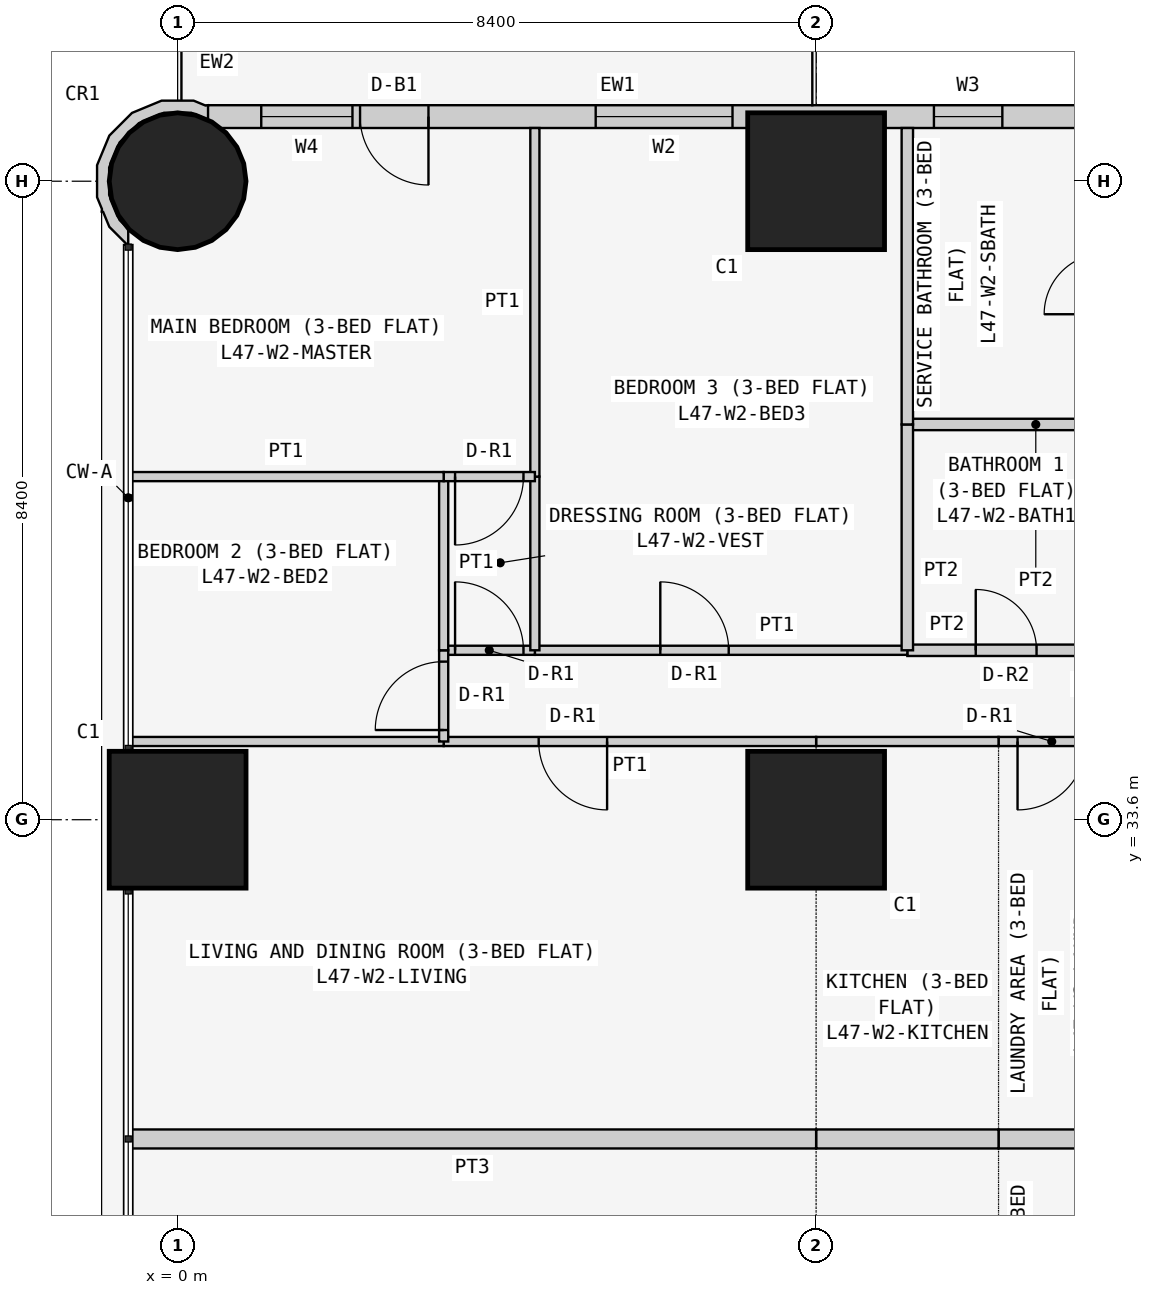
"""IFC4 building model, lengths in metres.
Left out: names, types, materials, properties, quantities, classifications, styles, units other than length and angle.
Written with IfcOpenShell. Run it as: python <this file> out.ifc"""

import sys

from ifc_helpers import new_model, si_unit, direction, frame, frame_2d, origin, origin_2d, place, context, subcontext, project, spatial, polyline, rectangle, circle, outline, extrude, element, fill, save


model = new_model("IFC4")
c1 = context("Model", 3, precision=1e-05, world=origin(), true_north=direction((0.0, 1.0)))
c2 = subcontext(c1, "Body", "Model", "MODEL_VIEW")
j1 = project(units=[si_unit("LENGTHUNIT", "METRE"), si_unit("PLANEANGLEUNIT", "RADIAN")], contexts=[c1])
p1 = place(None, origin())
s1 = spatial("IfcSite", under=j1, at=p1, CompositionType="ELEMENT")
p2 = place(p1, origin())
s2 = spatial("IfcBuilding", under=s1, at=p2, CompositionType="ELEMENT")
p3 = place(p2, frame((0.0, 0.0, 183.3)))
s3 = spatial("IfcBuildingStorey", under=s2, at=p3, CompositionType="ELEMENT", Elevation=183.3)
p4 = place(p3, frame((0.0, 33.6, 0.0), z_axis=(0.0, 0.0, 1.0), x_axis=(1.0, 0.0, 0.0)))
e1 = element("IfcColumn", 1, at=p4, inside=s3, PredefinedType="COLUMN", context=c2, shape_type="SweptSolid", body=[
    extrude(rectangle(XDim=1.8, YDim=1.8, at=origin_2d()), origin(), (0.0, 0.0, 1.0), 3.6),
])
p5 = place(p3, frame((0.0, 42.0, 0.0), z_axis=(0.0, 0.0, 1.0), x_axis=(1.0, 0.0, 0.0)))
e2 = element("IfcColumn", 2, at=p5, inside=s3, PredefinedType="COLUMN", context=c2, shape_type="SweptSolid", body=[
    extrude(circle(Radius=0.9, at=origin_2d()), origin(), (0.0, 0.0, 1.0), 3.6),
])
for number, where, z_axis, x_axis in (
    (3, (8.4, 33.6, 0.0), (0.0, 0.0, 1.0), (1.0, 0.0, 0.0)),
    (4, (8.4, 42.0, 0.0), (0.0, 0.0, 1.0), (1.0, 0.0, 0.0)),
):
    element("IfcColumn", number, at=place(p3, frame(where, z_axis=z_axis, x_axis=x_axis)), inside=s3, PredefinedType="COLUMN", context=c2, shape_type="SweptSolid", body=[
        extrude(rectangle(XDim=1.8, YDim=1.8, at=origin_2d()), origin(), (0.0, 0.0, 1.0), 3.6),
    ])
p6 = place(p3, frame((15.8, 42.85, 0.0), z_axis=(0.0, 0.0, 1.0), x_axis=(-1.0, 0.0, 0.0)))
e5 = element("IfcWall", 5, at=p6, inside=s3, PredefinedType="SOLIDWALL", context=c2, shape_type="SweptSolid", body=[
    extrude(rectangle(XDim=15.4, YDim=0.3, at=frame_2d((7.7, 0.0))), origin(), (0.0, 0.0, 1.0), 3.45),
])
p7 = place(p6, frame((1.2, 0.0, 0.9)))
e6 = element("IfcOpeningElement", 6, at=p7, cuts=e5, PredefinedType="OPENING", context=c2, shape_type="SweptSolid", body=[
    extrude(rectangle(XDim=1.8, YDim=1.5, at=frame_2d((0.9, 0.75))), frame((0.0, 0.16, 0.0), z_axis=(0.0, -1.0, 0.0), x_axis=(1.0, 0.0, 0.0)), (0.0, 0.0, 1.0), 0.32),
])
p8 = place(p6, frame((4.95, 0.0, 1.5)))
e7 = element("IfcOpeningElement", 7, at=p8, cuts=e5, PredefinedType="OPENING", context=c2, shape_type="SweptSolid", body=[
    extrude(rectangle(XDim=0.9, YDim=0.7, at=frame_2d((0.45, 0.35))), frame((0.0, 0.16, 0.0), z_axis=(0.0, -1.0, 0.0), x_axis=(1.0, 0.0, 0.0)), (0.0, 0.0, 1.0), 0.32),
])
p9 = place(p6, frame((8.5, 0.0, 0.9)))
e8 = element("IfcOpeningElement", 8, at=p9, cuts=e5, PredefinedType="OPENING", context=c2, shape_type="SweptSolid", body=[
    extrude(rectangle(XDim=1.8, YDim=1.5, at=frame_2d((0.9, 0.75))), frame((0.0, 0.16, 0.0), z_axis=(0.0, -1.0, 0.0), x_axis=(1.0, 0.0, 0.0)), (0.0, 0.0, 1.0), 0.32),
])
p10 = place(p6, frame((12.5, 0.0, 0.0)))
e9 = element("IfcOpeningElement", 9, at=p10, cuts=e5, PredefinedType="OPENING", context=c2, shape_type="SweptSolid", body=[
    extrude(rectangle(XDim=0.9, YDim=2.4, at=frame_2d((0.45, 1.2))), frame((0.0, 0.16, 0.0), z_axis=(0.0, -1.0, 0.0), x_axis=(1.0, 0.0, 0.0)), (0.0, 0.0, 1.0), 0.32),
])
p11 = place(p6, frame((13.5, 0.0, 0.9)))
e10 = element("IfcOpeningElement", 10, at=p11, cuts=e5, PredefinedType="OPENING", context=c2, shape_type="SweptSolid", body=[
    extrude(rectangle(XDim=1.2, YDim=1.5, at=frame_2d((0.6, 0.75))), frame((0.0, 0.16, 0.0), z_axis=(0.0, -1.0, 0.0), x_axis=(1.0, 0.0, 0.0)), (0.0, 0.0, 1.0), 0.32),
])
p12 = place(p3, frame((0.364, 42.91, 0.0), z_axis=(0.0, 0.0, 1.0), x_axis=(-0.926129809145, 0.377204953059, 0.0)))
e11 = element("IfcWall", 11, at=p12, inside=s3, PredefinedType="SOLIDWALL", context=c2, shape_type="SweptSolid", body=[
    extrude(outline(polyline([(0.36, 1.803), (0.509, 1.741), (0.761, 1.486), (0.896, 1.154), (0.894, 0.795), (0.755, 0.465), (0.5, 0.213), (0.168, 0.078), (-0.1, 0.08), (0.001, -0.097), (0.03, -0.08), (0.199, -0.081), (0.589, 0.078), (0.889, 0.374), (1.053, 0.763), (1.055, 1.185), (0.896, 1.575), (0.778, 1.695), (0.769, 1.728), (0.75, 1.723), (0.6, 1.875), (0.295, 2.003), (0.281, 1.998), (0.36, 1.803)])), origin(), (0.0, 0.0, 1.0), 3.45),
])
p13 = place(p3, frame((12.2, 29.4, 0.0), z_axis=(0.0, 0.0, 1.0), x_axis=(-1.0, 0.0, 0.0)))
e12 = element("IfcWall", 12, at=p13, inside=s3, PredefinedType="PARTITIONING", context=c2, shape_type="SweptSolid", body=[
    extrude(rectangle(XDim=1.4, YDim=0.25, at=frame_2d((0.7, 0.0))), origin(), (0.0, 0.0, 1.0), 3.45),
])
p14 = place(p3, frame((10.8, 29.4, 0.0), z_axis=(0.0, 0.0, 1.0), x_axis=(-1.0, 0.0, 0.0)))
e13 = element("IfcWall", 13, at=p14, inside=s3, PredefinedType="PARTITIONING", context=c2, shape_type="SweptSolid", body=[
    extrude(rectangle(XDim=2.4, YDim=0.25, at=frame_2d((1.2, 0.0))), origin(), (0.0, 0.0, 1.0), 3.45),
])
p15 = place(p3, frame((8.4, 29.4, 0.0), z_axis=(0.0, 0.0, 1.0), x_axis=(-1.0, 0.0, 0.0)))
e14 = element("IfcWall", 14, at=p15, inside=s3, PredefinedType="PARTITIONING", context=c2, shape_type="SweptSolid", body=[
    extrude(rectangle(XDim=9.05, YDim=0.25, at=frame_2d((4.525, 0.0))), origin(), (0.0, 0.0, 1.0), 3.45),
])
p16 = place(p3, frame((10.8, 34.629, 0.0), z_axis=(0.0, 0.0, 1.0), x_axis=(1.0, 0.0, 0.0)))
e15 = element("IfcWall", 15, at=p16, inside=s3, PredefinedType="PARTITIONING", context=c2, shape_type="SweptSolid", body=[
    extrude(rectangle(XDim=1.4, YDim=0.12, at=frame_2d((0.7, 0.0))), origin(), (0.0, 0.0, 1.0), 3.45),
])
p17 = place(p16, frame((0.25, 0.0, 0.0)))
e16 = element("IfcOpeningElement", 16, at=p17, cuts=e15, PredefinedType="OPENING", context=c2, shape_type="SweptSolid", body=[
    extrude(rectangle(XDim=0.9, YDim=2.1, at=frame_2d((0.45, 1.05))), frame((0.0, 0.07, 0.0), z_axis=(0.0, -1.0, 0.0), x_axis=(1.0, 0.0, 0.0)), (0.0, 0.0, 1.0), 0.14),
])
p18 = place(p3, frame((8.4, 34.629, 0.0), z_axis=(0.0, 0.0, 1.0), x_axis=(1.0, 0.0, 0.0)))
e17 = element("IfcWall", 17, at=p18, inside=s3, PredefinedType="PARTITIONING", context=c2, shape_type="SweptSolid", body=[
    extrude(rectangle(XDim=2.4, YDim=0.12, at=frame_2d((1.2, 0.0))), origin(), (0.0, 0.0, 1.0), 3.45),
])
p19 = place(p3, frame((3.5, 34.629, 0.0), z_axis=(0.0, 0.0, 1.0), x_axis=(1.0, 0.0, 0.0)))
e18 = element("IfcWall", 18, at=p19, inside=s3, PredefinedType="PARTITIONING", context=c2, shape_type="SweptSolid", body=[
    extrude(rectangle(XDim=4.9, YDim=0.12, at=frame_2d((2.45, 0.0))), origin(), (0.0, 0.0, 1.0), 3.45),
])
p20 = place(p19, frame((1.25, 0.0, 0.0)))
e19 = element("IfcOpeningElement", 19, at=p20, cuts=e18, PredefinedType="OPENING", context=c2, shape_type="SweptSolid", body=[
    extrude(rectangle(XDim=0.9, YDim=2.1, at=frame_2d((0.45, 1.05))), frame((0.0, 0.07, 0.0), z_axis=(0.0, -1.0, 0.0), x_axis=(1.0, 0.0, 0.0)), (0.0, 0.0, 1.0), 0.14),
])
p21 = place(p3, frame((-0.65, 34.629, 0.0), z_axis=(0.0, 0.0, 1.0), x_axis=(1.0, 0.0, 0.0)))
e20 = element("IfcWall", 20, at=p21, inside=s3, PredefinedType="PARTITIONING", context=c2, shape_type="SweptSolid", body=[
    extrude(rectangle(XDim=4.15, YDim=0.12, at=frame_2d((2.075, 0.0))), origin(), (0.0, 0.0, 1.0), 3.45),
])
p22 = place(p3, frame((9.6, 35.829, 0.0), z_axis=(0.0, 0.0, 1.0), x_axis=(1.0, 0.0, 0.0)))
e21 = element("IfcWall", 21, at=p22, inside=s3, PredefinedType="PARTITIONING", context=c2, shape_type="SweptSolid", body=[
    extrude(rectangle(XDim=2.6, YDim=0.15, at=frame_2d((1.3, 0.0))), origin(), (0.0, 0.0, 1.0), 3.45),
])
p23 = place(p22, frame((0.9, 0.0, 0.0)))
e22 = element("IfcOpeningElement", 22, at=p23, cuts=e21, PredefinedType="OPENING", context=c2, shape_type="SweptSolid", body=[
    extrude(rectangle(XDim=0.8, YDim=2.1, at=frame_2d((0.4, 1.05))), frame((0.0, 0.085, 0.0), z_axis=(0.0, -1.0, 0.0), x_axis=(1.0, 0.0, 0.0)), (0.0, 0.0, 1.0), 0.17),
])
p24 = place(p3, frame((4.7, 35.829, 0.0), z_axis=(0.0, 0.0, 1.0), x_axis=(1.0, 0.0, 0.0)))
e23 = element("IfcWall", 23, at=p24, inside=s3, PredefinedType="PARTITIONING", context=c2, shape_type="SweptSolid", body=[
    extrude(rectangle(XDim=4.9, YDim=0.12, at=frame_2d((2.45, 0.0))), origin(), (0.0, 0.0, 1.0), 3.45),
])
p25 = place(p24, frame((1.65, 0.0, 0.0)))
e24 = element("IfcOpeningElement", 24, at=p25, cuts=e23, PredefinedType="OPENING", context=c2, shape_type="SweptSolid", body=[
    extrude(rectangle(XDim=0.9, YDim=2.1, at=frame_2d((0.45, 1.05))), frame((0.0, 0.07, 0.0), z_axis=(0.0, -1.0, 0.0), x_axis=(1.0, 0.0, 0.0)), (0.0, 0.0, 1.0), 0.14),
])
p26 = place(p3, frame((3.5, 35.829, 0.0), z_axis=(0.0, 0.0, 1.0), x_axis=(1.0, 0.0, 0.0)))
e25 = element("IfcWall", 25, at=p26, inside=s3, PredefinedType="PARTITIONING", context=c2, shape_type="SweptSolid", body=[
    extrude(rectangle(XDim=1.2, YDim=0.12, at=frame_2d((0.6, 0.0))), origin(), (0.0, 0.0, 1.0), 3.45),
])
p27 = place(p26, frame((0.15, 0.0, 0.0)))
e26 = element("IfcOpeningElement", 26, at=p27, cuts=e25, PredefinedType="OPENING", context=c2, shape_type="SweptSolid", body=[
    extrude(rectangle(XDim=0.9, YDim=2.1, at=frame_2d((0.45, 1.05))), frame((0.0, 0.07, 0.0), z_axis=(0.0, -1.0, 0.0), x_axis=(1.0, 0.0, 0.0)), (0.0, 0.0, 1.0), 0.14),
])
p28 = place(p3, frame((3.5, 34.629, 0.0), z_axis=(0.0, 0.0, 1.0), x_axis=(0.0, 1.0, 0.0)))
e27 = element("IfcWall", 27, at=p28, inside=s3, PredefinedType="PARTITIONING", context=c2, shape_type="SweptSolid", body=[
    extrude(rectangle(XDim=1.2, YDim=0.12, at=frame_2d((0.6, 0.0))), origin(), (0.0, 0.0, 1.0), 3.45),
])
p29 = place(p28, frame((0.151, 0.0, 0.0)))
e28 = element("IfcOpeningElement", 28, at=p29, cuts=e27, PredefinedType="OPENING", context=c2, shape_type="SweptSolid", body=[
    extrude(rectangle(XDim=0.9, YDim=2.1, at=frame_2d((0.45, 1.05))), frame((0.0, 0.07, 0.0), z_axis=(0.0, -1.0, 0.0), x_axis=(1.0, 0.0, 0.0)), (0.0, 0.0, 1.0), 0.14),
])
p30 = place(p3, frame((9.6, 38.8, 0.0), z_axis=(0.0, 0.0, 1.0), x_axis=(1.0, 0.0, 0.0)))
e29 = element("IfcWall", 29, at=p30, inside=s3, PredefinedType="PARTITIONING", context=c2, shape_type="SweptSolid", body=[
    extrude(rectangle(XDim=2.6, YDim=0.15, at=frame_2d((1.3, 0.0))), origin(), (0.0, 0.0, 1.0), 3.45),
])
p31 = place(p3, frame((9.6, 35.829, 0.0), z_axis=(0.0, 0.0, 1.0), x_axis=(0.0, 1.0, 0.0)))
e30 = element("IfcWall", 30, at=p31, inside=s3, PredefinedType="PARTITIONING", context=c2, shape_type="SweptSolid", body=[
    extrude(rectangle(XDim=2.971, YDim=0.15, at=frame_2d((1.485, 0.0))), origin(), (0.0, 0.0, 1.0), 3.45),
])
p32 = place(p3, frame((9.6, 38.8, 0.0), z_axis=(0.0, 0.0, 1.0), x_axis=(0.0, 1.0, 0.0)))
e31 = element("IfcWall", 31, at=p32, inside=s3, PredefinedType="PARTITIONING", context=c2, shape_type="SweptSolid", body=[
    extrude(rectangle(XDim=3.9, YDim=0.15, at=frame_2d((1.95, 0.0))), origin(), (0.0, 0.0, 1.0), 3.45),
])
p33 = place(p3, frame((4.7, 35.829, 0.0), z_axis=(0.0, 0.0, 1.0), x_axis=(0.0, 1.0, 0.0)))
e32 = element("IfcWall", 32, at=p33, inside=s3, PredefinedType="PARTITIONING", context=c2, shape_type="SweptSolid", body=[
    extrude(rectangle(XDim=2.285, YDim=0.12, at=frame_2d((1.143, 0.0))), origin(), (0.0, 0.0, 1.0), 3.45),
])
p34 = place(p3, frame((4.7, 38.114, 0.0), z_axis=(0.0, 0.0, 1.0), x_axis=(0.0, 1.0, 0.0)))
e33 = element("IfcWall", 33, at=p34, inside=s3, PredefinedType="PARTITIONING", context=c2, shape_type="SweptSolid", body=[
    extrude(rectangle(XDim=4.586, YDim=0.12, at=frame_2d((2.293, 0.0))), origin(), (0.0, 0.0, 1.0), 3.45),
])
p35 = place(p3, frame((3.5, 35.829, 0.0), z_axis=(0.0, 0.0, 1.0), x_axis=(0.0, 1.0, 0.0)))
e34 = element("IfcWall", 34, at=p35, inside=s3, PredefinedType="PARTITIONING", context=c2, shape_type="SweptSolid", body=[
    extrude(rectangle(XDim=2.285, YDim=0.12, at=frame_2d((1.143, 0.0))), origin(), (0.0, 0.0, 1.0), 3.45),
])
p36 = place(p3, frame((3.5, 38.114, 0.0), z_axis=(0.0, 0.0, 1.0), x_axis=(1.0, 0.0, 0.0)))
e35 = element("IfcWall", 35, at=p36, inside=s3, PredefinedType="PARTITIONING", context=c2, shape_type="SweptSolid", body=[
    extrude(rectangle(XDim=1.2, YDim=0.12, at=frame_2d((0.6, 0.0))), origin(), (0.0, 0.0, 1.0), 3.45),
])
p37 = place(p36, frame((0.15, 0.0, 0.0)))
e36 = element("IfcOpeningElement", 36, at=p37, cuts=e35, PredefinedType="OPENING", context=c2, shape_type="SweptSolid", body=[
    extrude(rectangle(XDim=0.9, YDim=2.1, at=frame_2d((0.45, 1.05))), frame((0.0, 0.07, 0.0), z_axis=(0.0, -1.0, 0.0), x_axis=(1.0, 0.0, 0.0)), (0.0, 0.0, 1.0), 0.14),
])
p38 = place(p3, frame((-0.65, 38.114, 0.0), z_axis=(0.0, 0.0, 1.0), x_axis=(1.0, 0.0, 0.0)))
e37 = element("IfcWall", 37, at=p38, inside=s3, PredefinedType="PARTITIONING", context=c2, shape_type="SweptSolid", body=[
    extrude(rectangle(XDim=4.15, YDim=0.12, at=frame_2d((2.075, 0.0))), origin(), (0.0, 0.0, 1.0), 3.45),
])
p39 = place(p8, origin())
e38 = element("IfcWindow", 38, at=p39, inside=s3, PartitioningType="SINGLE_PANEL", PredefinedType="WINDOW", context=c2, shape_type="SweptSolid", body=[
    extrude(rectangle(XDim=0.9, YDim=0.7, at=frame_2d((0.45, 0.35))), frame((0.0, 0.03, 0.0), z_axis=(0.0, -1.0, 0.0), x_axis=(1.0, 0.0, 0.0)), (0.0, 0.0, 1.0), 0.06),
])
fill(e7, e38)
p40 = place(p9, origin())
e39 = element("IfcWindow", 39, at=p40, inside=s3, PartitioningType="SINGLE_PANEL", PredefinedType="WINDOW", context=c2, shape_type="SweptSolid", body=[
    extrude(rectangle(XDim=1.8, YDim=1.5, at=frame_2d((0.9, 0.75))), frame((0.0, 0.03, 0.0), z_axis=(0.0, -1.0, 0.0), x_axis=(1.0, 0.0, 0.0)), (0.0, 0.0, 1.0), 0.06),
])
fill(e8, e39)
p41 = place(p10, origin())
e40 = element("IfcDoor", 40, at=p41, inside=s3, OperationType="SINGLE_SWING_LEFT", PredefinedType="DOOR", context=c2, shape_type="SweptSolid", body=[
    extrude(rectangle(XDim=0.9, YDim=2.4, at=frame_2d((0.45, 1.2))), frame((0.0, 0.025, 0.0), z_axis=(0.0, -1.0, 0.0), x_axis=(1.0, 0.0, 0.0)), (0.0, 0.0, 1.0), 0.05),
])
fill(e9, e40)
p42 = place(p11, origin())
e41 = element("IfcWindow", 41, at=p42, inside=s3, PartitioningType="SINGLE_PANEL", PredefinedType="WINDOW", context=c2, shape_type="SweptSolid", body=[
    extrude(rectangle(XDim=1.2, YDim=1.5, at=frame_2d((0.6, 0.75))), frame((0.0, 0.03, 0.0), z_axis=(0.0, -1.0, 0.0), x_axis=(1.0, 0.0, 0.0)), (0.0, 0.0, 1.0), 0.06),
])
fill(e10, e41)
p43 = place(p17, frame((0.9, 0.0, 0.0), z_axis=(0.0, 0.0, 1.0), x_axis=(-1.0, 0.0, 0.0)))
e42 = element("IfcDoor", 42, at=p43, inside=s3, OperationType="SINGLE_SWING_RIGHT", PredefinedType="DOOR", context=c2, shape_type="SweptSolid", body=[
    extrude(rectangle(XDim=0.9, YDim=2.1, at=frame_2d((0.45, 1.05))), frame((0.0, 0.025, 0.0), z_axis=(0.0, -1.0, 0.0), x_axis=(1.0, 0.0, 0.0)), (0.0, 0.0, 1.0), 0.05),
])
fill(e16, e42)
p44 = place(p20, frame((0.9, 0.0, 0.0), z_axis=(0.0, 0.0, 1.0), x_axis=(-1.0, 0.0, 0.0)))
e43 = element("IfcDoor", 43, at=p44, inside=s3, OperationType="SINGLE_SWING_LEFT", PredefinedType="DOOR", context=c2, shape_type="SweptSolid", body=[
    extrude(rectangle(XDim=0.9, YDim=2.1, at=frame_2d((0.45, 1.05))), frame((0.0, 0.025, 0.0), z_axis=(0.0, -1.0, 0.0), x_axis=(1.0, 0.0, 0.0)), (0.0, 0.0, 1.0), 0.05),
])
fill(e19, e43)
p45 = place(p23, origin())
e44 = element("IfcDoor", 44, at=p45, inside=s3, OperationType="SINGLE_SWING_LEFT", PredefinedType="DOOR", context=c2, shape_type="SweptSolid", body=[
    extrude(rectangle(XDim=0.8, YDim=2.1, at=frame_2d((0.4, 1.05))), frame((0.0, 0.025, 0.0), z_axis=(0.0, -1.0, 0.0), x_axis=(1.0, 0.0, 0.0)), (0.0, 0.0, 1.0), 0.05),
])
fill(e22, e44)
p46 = place(p25, origin())
e45 = element("IfcDoor", 45, at=p46, inside=s3, OperationType="SINGLE_SWING_LEFT", PredefinedType="DOOR", context=c2, shape_type="SweptSolid", body=[
    extrude(rectangle(XDim=0.9, YDim=2.1, at=frame_2d((0.45, 1.05))), frame((0.0, 0.025, 0.0), z_axis=(0.0, -1.0, 0.0), x_axis=(1.0, 0.0, 0.0)), (0.0, 0.0, 1.0), 0.05),
])
fill(e24, e45)
p47 = place(p27, origin())
e46 = element("IfcDoor", 46, at=p47, inside=s3, OperationType="SINGLE_SWING_LEFT", PredefinedType="DOOR", context=c2, shape_type="SweptSolid", body=[
    extrude(rectangle(XDim=0.9, YDim=2.1, at=frame_2d((0.45, 1.05))), frame((0.0, 0.025, 0.0), z_axis=(0.0, -1.0, 0.0), x_axis=(1.0, 0.0, 0.0)), (0.0, 0.0, 1.0), 0.05),
])
fill(e26, e46)
p48 = place(p37, frame((0.9, 0.0, 0.0), z_axis=(0.0, 0.0, 1.0), x_axis=(-1.0, 0.0, 0.0)))
e47 = element("IfcDoor", 47, at=p48, inside=s3, OperationType="SINGLE_SWING_RIGHT", PredefinedType="DOOR", context=c2, shape_type="SweptSolid", body=[
    extrude(rectangle(XDim=0.9, YDim=2.1, at=frame_2d((0.45, 1.05))), frame((0.0, 0.025, 0.0), z_axis=(0.0, -1.0, 0.0), x_axis=(1.0, 0.0, 0.0)), (0.0, 0.0, 1.0), 0.05),
])
fill(e36, e47)
p49 = place(p29, origin())
e48 = element("IfcDoor", 48, at=p49, inside=s3, OperationType="SINGLE_SWING_LEFT", PredefinedType="DOOR", context=c2, shape_type="SweptSolid", body=[
    extrude(rectangle(XDim=0.9, YDim=2.1, at=frame_2d((0.45, 1.05))), frame((0.0, 0.025, 0.0), z_axis=(0.0, -1.0, 0.0), x_axis=(1.0, 0.0, 0.0)), (0.0, 0.0, 1.0), 0.05),
])
fill(e28, e48)
save(model, sys.argv[1])
